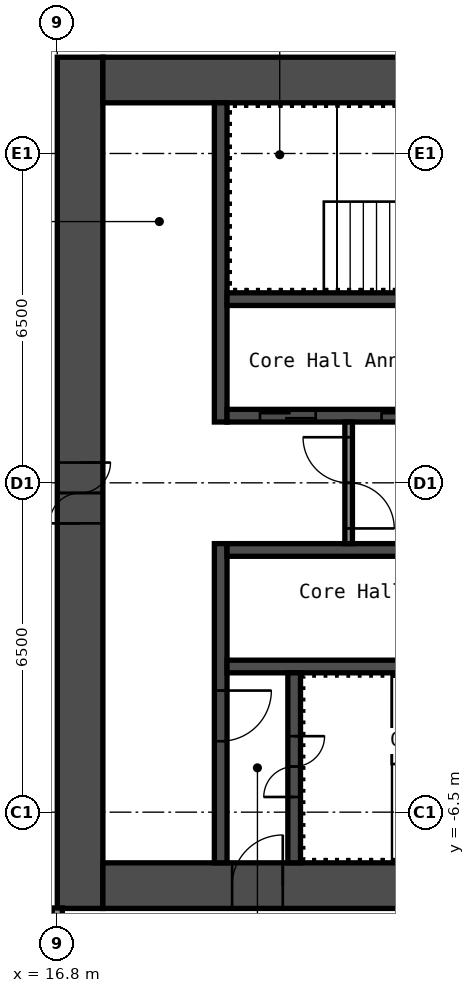
"""IFC4 building model, lengths in metres.
Left out: names, types, materials, properties, quantities, classifications, styles, units other than length and angle.
Written with IfcOpenShell. Run it as: python <this file> out.ifc"""

import sys

from ifc_helpers import new_model, si_unit, direction, frame, frame_2d, origin, place, context, subcontext, project, spatial, rectangle, extrude, element, fill, save


model = new_model("IFC4")
c1 = context("Model", 3, precision=1e-05, world=origin(), true_north=direction((0.0, 1.0)))
c2 = subcontext(c1, "Body", "Model", "MODEL_VIEW")
j1 = project(units=[si_unit("LENGTHUNIT", "METRE"), si_unit("PLANEANGLEUNIT", "RADIAN")], contexts=[c1])
p1 = place(None, origin())
s1 = spatial("IfcSite", under=j1, at=p1, CompositionType="ELEMENT")
p2 = place(p1, origin())
s2 = spatial("IfcBuilding", under=s1, at=p2, CompositionType="ELEMENT")
p3 = place(p2, frame((0.0, 0.0, 69.0)))
s3 = spatial("IfcBuildingStorey", under=s2, at=p3, CompositionType="ELEMENT", Elevation=69.0)
p4 = place(p3, frame((17.25, -8.4, 0.0), z_axis=(0.0, 0.0, 1.0), x_axis=(0.0, 1.0, 0.0)))
e1 = element("IfcWall", 1, at=p4, inside=s3, PredefinedType="SHEAR", context=c2, shape_type="SweptSolid", body=[
    extrude(rectangle(XDim=16.8, YDim=0.9, at=frame_2d((8.4, 0.0))), origin(), (0.0, 0.0, 1.0), 6.0),
])
p5 = place(p4, frame((7.6, 0.0, 0.0)))
e2 = element("IfcOpeningElement", 2, at=p5, cuts=e1, PredefinedType="OPENING", context=c2, shape_type="SweptSolid", body=[
    extrude(rectangle(XDim=1.2, YDim=2.1, at=frame_2d((0.6, 1.05))), frame((0.0, 0.46, 0.0), z_axis=(0.0, -1.0, 0.0), x_axis=(1.0, 0.0, 0.0)), (0.0, 0.0, 1.0), 0.92),
])
p6 = place(p3, frame((17.7, 7.95, 0.0), z_axis=(0.0, 0.0, 1.0), x_axis=(1.0, 0.0, 0.0)))
e3 = element("IfcWall", 3, at=p6, inside=s3, PredefinedType="SHEAR", context=c2, shape_type="SweptSolid", body=[
    extrude(rectangle(XDim=15.0, YDim=0.9, at=frame_2d((7.5, 0.0))), origin(), (0.0, 0.0, 1.0), 6.0),
])
p7 = place(p6, frame((10.4, 0.0, 0.0)))
e4 = element("IfcOpeningElement", 4, at=p7, cuts=e3, PredefinedType="OPENING", context=c2, shape_type="SweptSolid", body=[
    extrude(rectangle(XDim=1.2, YDim=2.1, at=frame_2d((0.6, 1.05))), frame((0.0, 0.46, 0.0), z_axis=(0.0, -1.0, 0.0), x_axis=(1.0, 0.0, 0.0)), (0.0, 0.0, 1.0), 0.92),
])
p8 = place(p6, frame((13.35, 0.0, 0.0)))
e5 = element("IfcOpeningElement", 5, at=p8, cuts=e3, PredefinedType="OPENING", context=c2, shape_type="SweptSolid", body=[
    extrude(rectangle(XDim=0.9, YDim=2.1, at=frame_2d((0.45, 1.05))), frame((0.0, 0.46, 0.0), z_axis=(0.0, -1.0, 0.0), x_axis=(1.0, 0.0, 0.0)), (0.0, 0.0, 1.0), 0.92),
])
p9 = place(p3, frame((17.7, -7.95, 0.0), z_axis=(0.0, 0.0, 1.0), x_axis=(1.0, 0.0, 0.0)))
e6 = element("IfcWall", 6, at=p9, inside=s3, PredefinedType="SHEAR", context=c2, shape_type="SweptSolid", body=[
    extrude(rectangle(XDim=15.0, YDim=0.9, at=frame_2d((7.5, 0.0))), origin(), (0.0, 0.0, 1.0), 6.0),
])
p10 = place(p9, frame((2.55, 0.0, 0.0)))
e7 = element("IfcOpeningElement", 7, at=p10, cuts=e6, PredefinedType="OPENING", context=c2, shape_type="SweptSolid", body=[
    extrude(rectangle(XDim=1.0, YDim=2.1, at=frame_2d((0.5, 1.05))), frame((0.0, 0.46, 0.0), z_axis=(0.0, -1.0, 0.0), x_axis=(1.0, 0.0, 0.0)), (0.0, 0.0, 1.0), 0.92),
])
p11 = place(p3, frame((20.025, 1.2, 0.0), z_axis=(0.0, 0.0, 1.0), x_axis=(0.0, 1.0, 0.0)))
e8 = element("IfcWall", 8, at=p11, inside=s3, PredefinedType="SHEAR", context=c2, shape_type="SweptSolid", body=[
    extrude(rectangle(XDim=6.3, YDim=0.25, at=frame_2d((3.15, 0.0))), origin(), (0.0, 0.0, 1.0), 6.0),
])
p12 = place(p3, frame((20.025, -7.5, 0.0), z_axis=(0.0, 0.0, 1.0), x_axis=(0.0, 1.0, 0.0)))
e9 = element("IfcWall", 9, at=p12, inside=s3, PredefinedType="SHEAR", context=c2, shape_type="SweptSolid", body=[
    extrude(rectangle(XDim=6.3, YDim=0.25, at=frame_2d((3.15, 0.0))), origin(), (0.0, 0.0, 1.0), 6.0),
])
p13 = place(p12, frame((2.4, 0.0, 0.0)))
e10 = element("IfcOpeningElement", 10, at=p13, cuts=e9, PredefinedType="OPENING", context=c2, shape_type="SweptSolid", body=[
    extrude(rectangle(XDim=1.0, YDim=2.1, at=frame_2d((0.5, 1.05))), frame((0.0, 0.135, 0.0), z_axis=(0.0, -1.0, 0.0), x_axis=(1.0, 0.0, 0.0)), (0.0, 0.0, 1.0), 0.27),
])
p14 = place(p3, frame((20.15, 1.325, 0.0), z_axis=(0.0, 0.0, 1.0), x_axis=(1.0, 0.0, 0.0)))
e11 = element("IfcWall", 11, at=p14, inside=s3, PredefinedType="SHEAR", context=c2, shape_type="SweptSolid", body=[
    extrude(rectangle(XDim=7.5, YDim=0.25, at=frame_2d((3.75, 0.0))), origin(), (0.0, 0.0, 1.0), 6.0),
])
p15 = place(p14, frame((0.65, 0.0, 0.0)))
e12 = element("IfcOpeningElement", 12, at=p15, cuts=e11, PredefinedType="OPENING", context=c2, shape_type="SweptSolid", body=[
    extrude(rectangle(XDim=1.1, YDim=2.1, at=frame_2d((0.55, 1.05))), frame((0.0, 0.135, 0.0), z_axis=(0.0, -1.0, 0.0), x_axis=(1.0, 0.0, 0.0)), (0.0, 0.0, 1.0), 0.27),
])
p16 = place(p14, frame((3.05, 0.0, 0.0)))
e13 = element("IfcOpeningElement", 13, at=p16, cuts=e11, PredefinedType="OPENING", context=c2, shape_type="SweptSolid", body=[
    extrude(rectangle(XDim=1.1, YDim=2.1, at=frame_2d((0.55, 1.05))), frame((0.0, 0.135, 0.0), z_axis=(0.0, -1.0, 0.0), x_axis=(1.0, 0.0, 0.0)), (0.0, 0.0, 1.0), 0.27),
])
p17 = place(p14, frame((5.45, 0.0, 0.0)))
e14 = element("IfcOpeningElement", 14, at=p17, cuts=e11, PredefinedType="OPENING", context=c2, shape_type="SweptSolid", body=[
    extrude(rectangle(XDim=1.1, YDim=2.1, at=frame_2d((0.55, 1.05))), frame((0.0, 0.135, 0.0), z_axis=(0.0, -1.0, 0.0), x_axis=(1.0, 0.0, 0.0)), (0.0, 0.0, 1.0), 0.27),
])
for number, where, z_axis, x_axis in (
    (15, (20.15, 3.625, 0.0), (0.0, 0.0, 1.0), (1.0, 0.0, 0.0)),
    (16, (20.15, -1.325, 0.0), (0.0, 0.0, 1.0), (1.0, 0.0, 0.0)),
    (17, (20.15, -3.625, 0.0), (0.0, 0.0, 1.0), (1.0, 0.0, 0.0)),
):
    element("IfcWall", number, at=place(p3, frame(where, z_axis=z_axis, x_axis=x_axis)), inside=s3, PredefinedType="SHEAR", context=c2, shape_type="SweptSolid", body=[
        extrude(rectangle(XDim=7.5, YDim=0.25, at=frame_2d((3.75, 0.0))), origin(), (0.0, 0.0, 1.0), 6.0),
    ])
p18 = place(p3, frame((21.475, -7.5, 0.0), z_axis=(0.0, 0.0, 1.0), x_axis=(0.0, 1.0, 0.0)))
e18 = element("IfcWall", 18, at=p18, inside=s3, PredefinedType="SHEAR", context=c2, shape_type="SweptSolid", body=[
    extrude(rectangle(XDim=3.75, YDim=0.25, at=frame_2d((1.875, 0.0))), origin(), (0.0, 0.0, 1.0), 6.0),
])
p19 = place(p18, frame((1.3, 0.0, 0.0)))
e19 = element("IfcOpeningElement", 19, at=p19, cuts=e18, PredefinedType="OPENING", context=c2, shape_type="SweptSolid", body=[
    extrude(rectangle(XDim=1.2, YDim=2.1, at=frame_2d((0.6, 1.05))), frame((0.0, 0.135, 0.0), z_axis=(0.0, -1.0, 0.0), x_axis=(1.0, 0.0, 0.0)), (0.0, 0.0, 1.0), 0.27),
])
p20 = place(p3, frame((22.55, -1.2, 0.0), z_axis=(0.0, 0.0, 1.0), x_axis=(0.0, 1.0, 0.0)))
e20 = element("IfcWall", 20, at=p20, inside=s3, PredefinedType="PARTITIONING", context=c2, shape_type="SweptSolid", body=[
    extrude(rectangle(XDim=2.4, YDim=0.15, at=frame_2d((1.2, 0.0))), origin(), (0.0, 0.0, 1.0), 6.0),
])
p21 = place(p20, frame((0.3, 0.0, 0.0)))
e21 = element("IfcOpeningElement", 21, at=p21, cuts=e20, PredefinedType="OPENING", context=c2, shape_type="SweptSolid", body=[
    extrude(rectangle(XDim=1.8, YDim=2.1, at=frame_2d((0.9, 1.05))), frame((0.0, 0.085, 0.0), z_axis=(0.0, -1.0, 0.0), x_axis=(1.0, 0.0, 0.0)), (0.0, 0.0, 1.0), 0.17),
])
p22 = place(p3, frame((16.8, -15.55, 0.0), z_axis=(0.0, 0.0, 1.0), x_axis=(0.0, 1.0, 0.0)))
e22 = element("IfcWall", 22, at=p22, inside=s3, PredefinedType="PARTITIONING", context=c2, shape_type="SweptSolid", body=[
    extrude(rectangle(XDim=7.16, YDim=0.2, at=frame_2d((3.58, 0.0))), origin(), (0.0, 0.0, 1.0), 6.0),
])
p23 = place(p5, origin())
e23 = element("IfcDoor", 23, at=p23, inside=s3, OperationType="DOUBLE_DOOR_SINGLE_SWING", PredefinedType="DOOR", context=c2, shape_type="SweptSolid", body=[
    extrude(rectangle(XDim=1.2, YDim=2.1, at=frame_2d((0.6, 1.05))), frame((0.0, 0.025, 0.0), z_axis=(0.0, -1.0, 0.0), x_axis=(1.0, 0.0, 0.0)), (0.0, 0.0, 1.0), 0.05),
])
fill(e2, e23)
p24 = place(p10, origin())
e24 = element("IfcDoor", 24, at=p24, inside=s3, OperationType="SINGLE_SWING_LEFT", PredefinedType="DOOR", context=c2, shape_type="SweptSolid", body=[
    extrude(rectangle(XDim=1.0, YDim=2.1, at=frame_2d((0.5, 1.05))), frame((0.0, 0.025, 0.0), z_axis=(0.0, -1.0, 0.0), x_axis=(1.0, 0.0, 0.0)), (0.0, 0.0, 1.0), 0.05),
])
fill(e7, e24)
p25 = place(p19, origin())
e25 = element("IfcDoor", 25, at=p25, inside=s3, OperationType="DOUBLE_DOOR_SINGLE_SWING", PredefinedType="DOOR", context=c2, shape_type="SweptSolid", body=[
    extrude(rectangle(XDim=1.2, YDim=2.1, at=frame_2d((0.6, 1.05))), frame((0.0, 0.025, 0.0), z_axis=(0.0, -1.0, 0.0), x_axis=(1.0, 0.0, 0.0)), (0.0, 0.0, 1.0), 0.05),
])
fill(e19, e25)
p26 = place(p13, origin())
e26 = element("IfcDoor", 26, at=p26, inside=s3, OperationType="SINGLE_SWING_RIGHT", PredefinedType="DOOR", context=c2, shape_type="SweptSolid", body=[
    extrude(rectangle(XDim=1.0, YDim=2.1, at=frame_2d((0.5, 1.05))), frame((0.0, 0.025, 0.0), z_axis=(0.0, -1.0, 0.0), x_axis=(1.0, 0.0, 0.0)), (0.0, 0.0, 1.0), 0.05),
])
fill(e10, e26)
p27 = place(p21, origin())
e27 = element("IfcDoor", 27, at=p27, inside=s3, OperationType="DOUBLE_DOOR_SINGLE_SWING", PredefinedType="DOOR", context=c2, shape_type="SweptSolid", body=[
    extrude(rectangle(XDim=1.8, YDim=2.1, at=frame_2d((0.9, 1.05))), frame((0.0, 0.025, 0.0), z_axis=(0.0, -1.0, 0.0), x_axis=(1.0, 0.0, 0.0)), (0.0, 0.0, 1.0), 0.05),
])
fill(e21, e27)
p28 = place(p15, origin())
e28 = element("IfcDoor", 28, at=p28, inside=s3, OperationType="DOUBLE_DOOR_SLIDING", PredefinedType="DOOR", context=c2, shape_type="SweptSolid", body=[
    extrude(rectangle(XDim=1.1, YDim=2.1, at=frame_2d((0.55, 1.05))), frame((0.0, 0.025, 0.0), z_axis=(0.0, -1.0, 0.0), x_axis=(1.0, 0.0, 0.0)), (0.0, 0.0, 1.0), 0.05),
])
fill(e12, e28)
p29 = place(p16, origin())
e29 = element("IfcDoor", 29, at=p29, inside=s3, OperationType="DOUBLE_DOOR_SLIDING", PredefinedType="DOOR", context=c2, shape_type="SweptSolid", body=[
    extrude(rectangle(XDim=1.1, YDim=2.1, at=frame_2d((0.55, 1.05))), frame((0.0, 0.025, 0.0), z_axis=(0.0, -1.0, 0.0), x_axis=(1.0, 0.0, 0.0)), (0.0, 0.0, 1.0), 0.05),
])
fill(e13, e29)
save(model, sys.argv[1])
